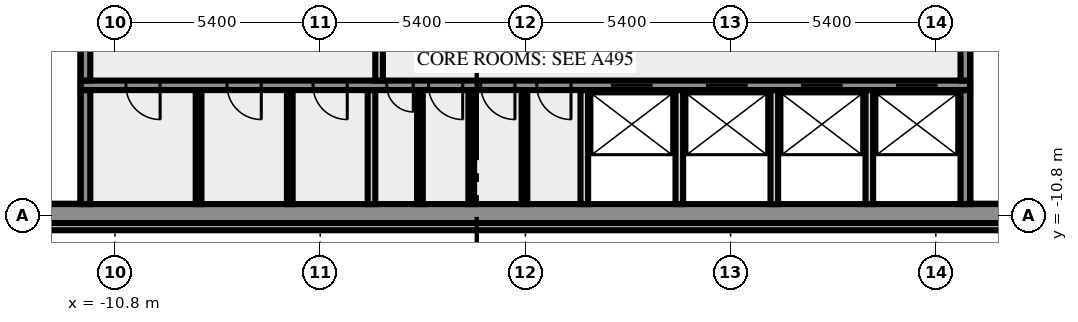
"""IFC4 building model, lengths in metres.
Left out: names, types, materials, properties, quantities, classifications, styles, units other than length and angle.
Written with IfcOpenShell. Run it as: python <this file> out.ifc"""

import sys

from ifc_helpers import new_model, si_unit, direction, frame, frame_2d, origin, place, context, subcontext, project, spatial, rectangle, extrude, element, fill, save


model = new_model("IFC4")
c1 = context("Model", 3, precision=1e-05, world=origin(), true_north=direction((0.0, 1.0)))
c2 = subcontext(c1, "Body", "Model", "MODEL_VIEW")
j1 = project(units=[si_unit("LENGTHUNIT", "METRE"), si_unit("PLANEANGLEUNIT", "RADIAN")], contexts=[c1])
p1 = place(None, origin())
s1 = spatial("IfcSite", under=j1, at=p1, CompositionType="ELEMENT")
p2 = place(p1, origin())
s2 = spatial("IfcBuilding", under=s1, at=p2, CompositionType="ELEMENT")
p3 = place(p2, frame((0.0, 0.0, 214.0)))
s3 = spatial("IfcBuildingStorey", under=s2, at=p3, CompositionType="ELEMENT", Elevation=214.0)
p4 = place(p3, frame((-17.444, -11.088, 0.0), z_axis=(0.0, 0.0, 1.0), x_axis=(1.0, 0.0, 0.0)))
e1 = element("IfcWall", 1, at=p4, inside=s3, PredefinedType="SOLIDWALL", context=c2, shape_type="SweptSolid", body=[
    extrude(rectangle(XDim=34.888, YDim=0.2, at=frame_2d((17.444, 0.0))), origin(), (0.0, 0.0, 1.0), 3.65),
])
p5 = place(p3, frame((-20.0, -10.75, 0.0), z_axis=(0.0, 0.0, 1.0), x_axis=(1.0, 0.0, 0.0)))
e2 = element("IfcWall", 2, at=p5, inside=s3, PredefinedType="SHEAR", context=c2, shape_type="SweptSolid", body=[
    extrude(rectangle(XDim=40.0, YDim=0.5, at=frame_2d((20.0, 0.0))), origin(), (0.0, 0.0, 1.0), 3.65),
])
p6 = place(p5, frame((0.8, 0.0, 1.0)))
e3 = element("IfcOpeningElement", 3, at=p6, cuts=e2, PredefinedType="OPENING", context=c2, shape_type="SweptSolid", body=[
    extrude(rectangle(XDim=1.2, YDim=1.2, at=frame_2d((0.6, 0.6))), frame((0.0, 0.26, 0.0), z_axis=(0.0, -1.0, 0.0), x_axis=(1.0, 0.0, 0.0)), (0.0, 0.0, 1.0), 0.52),
])
p7 = place(p5, frame((38.0, 0.0, 1.0)))
e4 = element("IfcOpeningElement", 4, at=p7, cuts=e2, PredefinedType="OPENING", context=c2, shape_type="SweptSolid", body=[
    extrude(rectangle(XDim=1.2, YDim=1.2, at=frame_2d((0.6, 0.6))), frame((0.0, 0.26, 0.0), z_axis=(0.0, -1.0, 0.0), x_axis=(1.0, 0.0, 0.0)), (0.0, 0.0, 1.0), 0.52),
])
p8 = place(p3, frame((-11.575, -10.5, 0.0), z_axis=(0.0, 0.0, 1.0), x_axis=(0.0, 1.0, 0.0)))
e5 = element("IfcWall", 5, at=p8, inside=s3, PredefinedType="SHEAR", context=c2, shape_type="SweptSolid", body=[
    extrude(rectangle(XDim=3.0, YDim=0.25, at=frame_2d((1.5, 0.0))), origin(), (0.0, 0.0, 1.0), 3.65),
])
for number, where, z_axis, x_axis in (
    (6, (-8.6, -10.5, 0.0), (0.0, 0.0, 1.0), (0.0, 1.0, 0.0)),
    (7, (-6.2, -10.5, 0.0), (0.0, 0.0, 1.0), (0.0, 1.0, 0.0)),
):
    element("IfcWall", number, at=place(p3, frame(where, z_axis=z_axis, x_axis=x_axis)), inside=s3, PredefinedType="PARTITIONING", context=c2, shape_type="SweptSolid", body=[
        extrude(rectangle(XDim=3.0, YDim=0.15, at=frame_2d((1.5, 0.0))), origin(), (0.0, 0.0, 1.0), 3.65),
    ])
p9 = place(p3, frame((-4.05, -10.5, 0.0), z_axis=(0.0, 0.0, 1.0), x_axis=(0.0, 1.0, 0.0)))
e8 = element("IfcWall", 8, at=p9, inside=s3, PredefinedType="SOLIDWALL", context=c2, shape_type="SweptSolid", body=[
    extrude(rectangle(XDim=3.0, YDim=0.2, at=frame_2d((1.5, 0.0))), origin(), (0.0, 0.0, 1.0), 3.65),
])
for number, where, z_axis, x_axis in (
    (9, (-2.775, -10.5, 0.0), (0.0, 0.0, 1.0), (0.0, 1.0, 0.0)),
    (10, (-1.425, -10.5, 0.0), (0.0, 0.0, 1.0), (0.0, 1.0, 0.0)),
    (11, (-0.025, -10.5, 0.0), (0.0, 0.0, 1.0), (0.0, 1.0, 0.0)),
):
    element("IfcWall", number, at=place(p3, frame(where, z_axis=z_axis, x_axis=x_axis)), inside=s3, PredefinedType="PARTITIONING", context=c2, shape_type="SweptSolid", body=[
        extrude(rectangle(XDim=3.0, YDim=0.15, at=frame_2d((1.5, 0.0))), origin(), (0.0, 0.0, 1.0), 3.65),
    ])
for number, where, z_axis, x_axis in (
    (12, (1.55, -10.5, 0.0), (0.0, 0.0, 1.0), (0.0, 1.0, 0.0)),
    (13, (4.05, -10.5, 0.0), (0.0, 0.0, 1.0), (0.0, 1.0, 0.0)),
    (14, (6.55, -10.5, 0.0), (0.0, 0.0, 1.0), (0.0, 1.0, 0.0)),
    (15, (9.05, -10.5, 0.0), (0.0, 0.0, 1.0), (0.0, 1.0, 0.0)),
):
    element("IfcWall", number, at=place(p3, frame(where, z_axis=z_axis, x_axis=x_axis)), inside=s3, PredefinedType="SOLIDWALL", context=c2, shape_type="SweptSolid", body=[
        extrude(rectangle(XDim=3.0, YDim=0.2, at=frame_2d((1.5, 0.0))), origin(), (0.0, 0.0, 1.0), 3.65),
    ])
p10 = place(p3, frame((11.575, -10.5, 0.0), z_axis=(0.0, 0.0, 1.0), x_axis=(0.0, 1.0, 0.0)))
e16 = element("IfcWall", 16, at=p10, inside=s3, PredefinedType="SHEAR", context=c2, shape_type="SweptSolid", body=[
    extrude(rectangle(XDim=3.0, YDim=0.25, at=frame_2d((1.5, 0.0))), origin(), (0.0, 0.0, 1.0), 3.65),
])
p11 = place(p3, frame((11.7, -7.375, 0.0), z_axis=(0.0, 0.0, 1.0), x_axis=(-1.0, 0.0, 0.0)))
e17 = element("IfcWall", 17, at=p11, inside=s3, PredefinedType="SHEAR", context=c2, shape_type="SweptSolid", body=[
    extrude(rectangle(XDim=23.4, YDim=0.25, at=frame_2d((11.7, 0.0))), origin(), (0.0, 0.0, 1.0), 3.65),
])
p12 = place(p11, frame((21.312, 0.0, 0.0)))
e18 = element("IfcOpeningElement", 18, at=p12, cuts=e17, PredefinedType="OPENING", context=c2, shape_type="SweptSolid", body=[
    extrude(rectangle(XDim=0.9, YDim=2.1, at=frame_2d((0.45, 1.05))), frame((0.0, 0.135, 0.0), z_axis=(0.0, -1.0, 0.0), x_axis=(1.0, 0.0, 0.0)), (0.0, 0.0, 1.0), 0.27),
])
p13 = place(p11, frame((18.65, 0.0, 0.0)))
e19 = element("IfcOpeningElement", 19, at=p13, cuts=e17, PredefinedType="OPENING", context=c2, shape_type="SweptSolid", body=[
    extrude(rectangle(XDim=0.9, YDim=2.1, at=frame_2d((0.45, 1.05))), frame((0.0, 0.135, 0.0), z_axis=(0.0, -1.0, 0.0), x_axis=(1.0, 0.0, 0.0)), (0.0, 0.0, 1.0), 0.27),
])
p14 = place(p11, frame((16.388, 0.0, 0.0)))
e20 = element("IfcOpeningElement", 20, at=p14, cuts=e17, PredefinedType="OPENING", context=c2, shape_type="SweptSolid", body=[
    extrude(rectangle(XDim=0.9, YDim=2.1, at=frame_2d((0.45, 1.05))), frame((0.0, 0.135, 0.0), z_axis=(0.0, -1.0, 0.0), x_axis=(1.0, 0.0, 0.0)), (0.0, 0.0, 1.0), 0.27),
])
p15 = place(p11, frame((14.65, 0.0, 0.0)))
e21 = element("IfcOpeningElement", 21, at=p15, cuts=e17, PredefinedType="OPENING", context=c2, shape_type="SweptSolid", body=[
    extrude(rectangle(XDim=0.7, YDim=2.1, at=frame_2d((0.35, 1.05))), frame((0.0, 0.135, 0.0), z_axis=(0.0, -1.0, 0.0), x_axis=(1.0, 0.0, 0.0)), (0.0, 0.0, 1.0), 0.27),
])
p16 = place(p11, frame((13.35, 0.0, 0.0)))
e22 = element("IfcOpeningElement", 22, at=p16, cuts=e17, PredefinedType="OPENING", context=c2, shape_type="SweptSolid", body=[
    extrude(rectangle(XDim=0.9, YDim=2.1, at=frame_2d((0.45, 1.05))), frame((0.0, 0.135, 0.0), z_axis=(0.0, -1.0, 0.0), x_axis=(1.0, 0.0, 0.0)), (0.0, 0.0, 1.0), 0.27),
])
p17 = place(p11, frame((11.975, 0.0, 0.0)))
e23 = element("IfcOpeningElement", 23, at=p17, cuts=e17, PredefinedType="OPENING", context=c2, shape_type="SweptSolid", body=[
    extrude(rectangle(XDim=0.9, YDim=2.1, at=frame_2d((0.45, 1.05))), frame((0.0, 0.135, 0.0), z_axis=(0.0, -1.0, 0.0), x_axis=(1.0, 0.0, 0.0)), (0.0, 0.0, 1.0), 0.27),
])
p18 = place(p11, frame((10.5, 0.0, 0.0)))
e24 = element("IfcOpeningElement", 24, at=p18, cuts=e17, PredefinedType="OPENING", context=c2, shape_type="SweptSolid", body=[
    extrude(rectangle(XDim=0.9, YDim=2.1, at=frame_2d((0.45, 1.05))), frame((0.0, 0.135, 0.0), z_axis=(0.0, -1.0, 0.0), x_axis=(1.0, 0.0, 0.0)), (0.0, 0.0, 1.0), 0.27),
])
p19 = place(p11, frame((8.35, 0.0, 0.0)))
e25 = element("IfcOpeningElement", 25, at=p19, cuts=e17, PredefinedType="OPENING", context=c2, shape_type="SweptSolid", body=[
    extrude(rectangle(XDim=1.1, YDim=2.1, at=frame_2d((0.55, 1.05))), frame((0.0, 0.135, 0.0), z_axis=(0.0, -1.0, 0.0), x_axis=(1.0, 0.0, 0.0)), (0.0, 0.0, 1.0), 0.27),
])
p20 = place(p11, frame((5.85, 0.0, 0.0)))
e26 = element("IfcOpeningElement", 26, at=p20, cuts=e17, PredefinedType="OPENING", context=c2, shape_type="SweptSolid", body=[
    extrude(rectangle(XDim=1.1, YDim=2.1, at=frame_2d((0.55, 1.05))), frame((0.0, 0.135, 0.0), z_axis=(0.0, -1.0, 0.0), x_axis=(1.0, 0.0, 0.0)), (0.0, 0.0, 1.0), 0.27),
])
p21 = place(p11, frame((3.35, 0.0, 0.0)))
e27 = element("IfcOpeningElement", 27, at=p21, cuts=e17, PredefinedType="OPENING", context=c2, shape_type="SweptSolid", body=[
    extrude(rectangle(XDim=1.1, YDim=2.1, at=frame_2d((0.55, 1.05))), frame((0.0, 0.135, 0.0), z_axis=(0.0, -1.0, 0.0), x_axis=(1.0, 0.0, 0.0)), (0.0, 0.0, 1.0), 0.27),
])
p22 = place(p11, frame((0.85, 0.0, 0.0)))
e28 = element("IfcOpeningElement", 28, at=p22, cuts=e17, PredefinedType="OPENING", context=c2, shape_type="SweptSolid", body=[
    extrude(rectangle(XDim=1.1, YDim=2.1, at=frame_2d((0.55, 1.05))), frame((0.0, 0.135, 0.0), z_axis=(0.0, -1.0, 0.0), x_axis=(1.0, 0.0, 0.0)), (0.0, 0.0, 1.0), 0.27),
])
p23 = place(p3, frame((-11.575, -7.25, 0.0), z_axis=(0.0, 0.0, 1.0), x_axis=(0.0, 1.0, 0.0)))
e29 = element("IfcWall", 29, at=p23, inside=s3, PredefinedType="SHEAR", context=c2, shape_type="SweptSolid", body=[
    extrude(rectangle(XDim=1.0, YDim=0.25, at=frame_2d((0.5, 0.0))), origin(), (0.0, 0.0, 1.0), 3.65),
])
p24 = place(p3, frame((-3.85, -4.25, 0.0), z_axis=(0.0, 0.0, 1.0), x_axis=(0.0, -1.0, 0.0)))
e30 = element("IfcWall", 30, at=p24, inside=s3, PredefinedType="SOLIDWALL", context=c2, shape_type="SweptSolid", body=[
    extrude(rectangle(XDim=3.0, YDim=0.2, at=frame_2d((1.5, 0.0))), origin(), (0.0, 0.0, 1.0), 3.65),
])
p25 = place(p24, frame((0.8, 0.0, 0.0)))
e31 = element("IfcOpeningElement", 31, at=p25, cuts=e30, PredefinedType="OPENING", context=c2, shape_type="SweptSolid", body=[
    extrude(rectangle(XDim=1.4, YDim=2.1, at=frame_2d((0.7, 1.05))), frame((0.0, 0.11, 0.0), z_axis=(0.0, -1.0, 0.0), x_axis=(1.0, 0.0, 0.0)), (0.0, 0.0, 1.0), 0.22),
])
p26 = place(p3, frame((11.575, -7.25, 0.0), z_axis=(0.0, 0.0, 1.0), x_axis=(0.0, 1.0, 0.0)))
e32 = element("IfcWall", 32, at=p26, inside=s3, PredefinedType="SHEAR", context=c2, shape_type="SweptSolid", body=[
    extrude(rectangle(XDim=1.0, YDim=0.25, at=frame_2d((0.5, 0.0))), origin(), (0.0, 0.0, 1.0), 3.65),
])
p27 = place(p12, origin())
e33 = element("IfcDoor", 33, at=p27, inside=s3, OperationType="SINGLE_SWING_RIGHT", PredefinedType="DOOR", context=c2, shape_type="SweptSolid", body=[
    extrude(rectangle(XDim=0.9, YDim=2.1, at=frame_2d((0.45, 1.05))), frame((0.0, 0.025, 0.0), z_axis=(0.0, -1.0, 0.0), x_axis=(1.0, 0.0, 0.0)), (0.0, 0.0, 1.0), 0.05),
])
fill(e18, e33)
p28 = place(p13, origin())
e34 = element("IfcDoor", 34, at=p28, inside=s3, OperationType="SINGLE_SWING_RIGHT", PredefinedType="DOOR", context=c2, shape_type="SweptSolid", body=[
    extrude(rectangle(XDim=0.9, YDim=2.1, at=frame_2d((0.45, 1.05))), frame((0.0, 0.025, 0.0), z_axis=(0.0, -1.0, 0.0), x_axis=(1.0, 0.0, 0.0)), (0.0, 0.0, 1.0), 0.05),
])
fill(e19, e34)
p29 = place(p14, origin())
e35 = element("IfcDoor", 35, at=p29, inside=s3, OperationType="SINGLE_SWING_RIGHT", PredefinedType="DOOR", context=c2, shape_type="SweptSolid", body=[
    extrude(rectangle(XDim=0.9, YDim=2.1, at=frame_2d((0.45, 1.05))), frame((0.0, 0.025, 0.0), z_axis=(0.0, -1.0, 0.0), x_axis=(1.0, 0.0, 0.0)), (0.0, 0.0, 1.0), 0.05),
])
fill(e20, e35)
p30 = place(p15, origin())
e36 = element("IfcDoor", 36, at=p30, inside=s3, OperationType="SINGLE_SWING_RIGHT", PredefinedType="DOOR", context=c2, shape_type="SweptSolid", body=[
    extrude(rectangle(XDim=0.7, YDim=2.1, at=frame_2d((0.35, 1.05))), frame((0.0, 0.025, 0.0), z_axis=(0.0, -1.0, 0.0), x_axis=(1.0, 0.0, 0.0)), (0.0, 0.0, 1.0), 0.05),
])
fill(e21, e36)
p31 = place(p16, origin())
e37 = element("IfcDoor", 37, at=p31, inside=s3, OperationType="SINGLE_SWING_RIGHT", PredefinedType="DOOR", context=c2, shape_type="SweptSolid", body=[
    extrude(rectangle(XDim=0.9, YDim=2.1, at=frame_2d((0.45, 1.05))), frame((0.0, 0.025, 0.0), z_axis=(0.0, -1.0, 0.0), x_axis=(1.0, 0.0, 0.0)), (0.0, 0.0, 1.0), 0.05),
])
fill(e22, e37)
p32 = place(p17, origin())
e38 = element("IfcDoor", 38, at=p32, inside=s3, OperationType="SINGLE_SWING_RIGHT", PredefinedType="DOOR", context=c2, shape_type="SweptSolid", body=[
    extrude(rectangle(XDim=0.9, YDim=2.1, at=frame_2d((0.45, 1.05))), frame((0.0, 0.025, 0.0), z_axis=(0.0, -1.0, 0.0), x_axis=(1.0, 0.0, 0.0)), (0.0, 0.0, 1.0), 0.05),
])
fill(e23, e38)
p33 = place(p18, origin())
e39 = element("IfcDoor", 39, at=p33, inside=s3, OperationType="SINGLE_SWING_LEFT", PredefinedType="DOOR", context=c2, shape_type="SweptSolid", body=[
    extrude(rectangle(XDim=0.9, YDim=2.1, at=frame_2d((0.45, 1.05))), frame((0.0, 0.025, 0.0), z_axis=(0.0, -1.0, 0.0), x_axis=(1.0, 0.0, 0.0)), (0.0, 0.0, 1.0), 0.05),
])
fill(e24, e39)
p34 = place(p19, origin())
e40 = element("IfcDoor", 40, at=p34, inside=s3, OperationType="DOUBLE_DOOR_SLIDING", PredefinedType="DOOR", context=c2, shape_type="SweptSolid", body=[
    extrude(rectangle(XDim=1.1, YDim=2.1, at=frame_2d((0.55, 1.05))), frame((0.0, 0.025, 0.0), z_axis=(0.0, -1.0, 0.0), x_axis=(1.0, 0.0, 0.0)), (0.0, 0.0, 1.0), 0.05),
])
fill(e25, e40)
p35 = place(p20, origin())
e41 = element("IfcDoor", 41, at=p35, inside=s3, OperationType="DOUBLE_DOOR_SLIDING", PredefinedType="DOOR", context=c2, shape_type="SweptSolid", body=[
    extrude(rectangle(XDim=1.1, YDim=2.1, at=frame_2d((0.55, 1.05))), frame((0.0, 0.025, 0.0), z_axis=(0.0, -1.0, 0.0), x_axis=(1.0, 0.0, 0.0)), (0.0, 0.0, 1.0), 0.05),
])
fill(e26, e41)
p36 = place(p21, origin())
e42 = element("IfcDoor", 42, at=p36, inside=s3, OperationType="DOUBLE_DOOR_SLIDING", PredefinedType="DOOR", context=c2, shape_type="SweptSolid", body=[
    extrude(rectangle(XDim=1.1, YDim=2.1, at=frame_2d((0.55, 1.05))), frame((0.0, 0.025, 0.0), z_axis=(0.0, -1.0, 0.0), x_axis=(1.0, 0.0, 0.0)), (0.0, 0.0, 1.0), 0.05),
])
fill(e27, e42)
p37 = place(p22, origin())
e43 = element("IfcDoor", 43, at=p37, inside=s3, OperationType="DOUBLE_DOOR_SLIDING", PredefinedType="DOOR", context=c2, shape_type="SweptSolid", body=[
    extrude(rectangle(XDim=1.1, YDim=2.1, at=frame_2d((0.55, 1.05))), frame((0.0, 0.025, 0.0), z_axis=(0.0, -1.0, 0.0), x_axis=(1.0, 0.0, 0.0)), (0.0, 0.0, 1.0), 0.05),
])
fill(e28, e43)
save(model, sys.argv[1])
